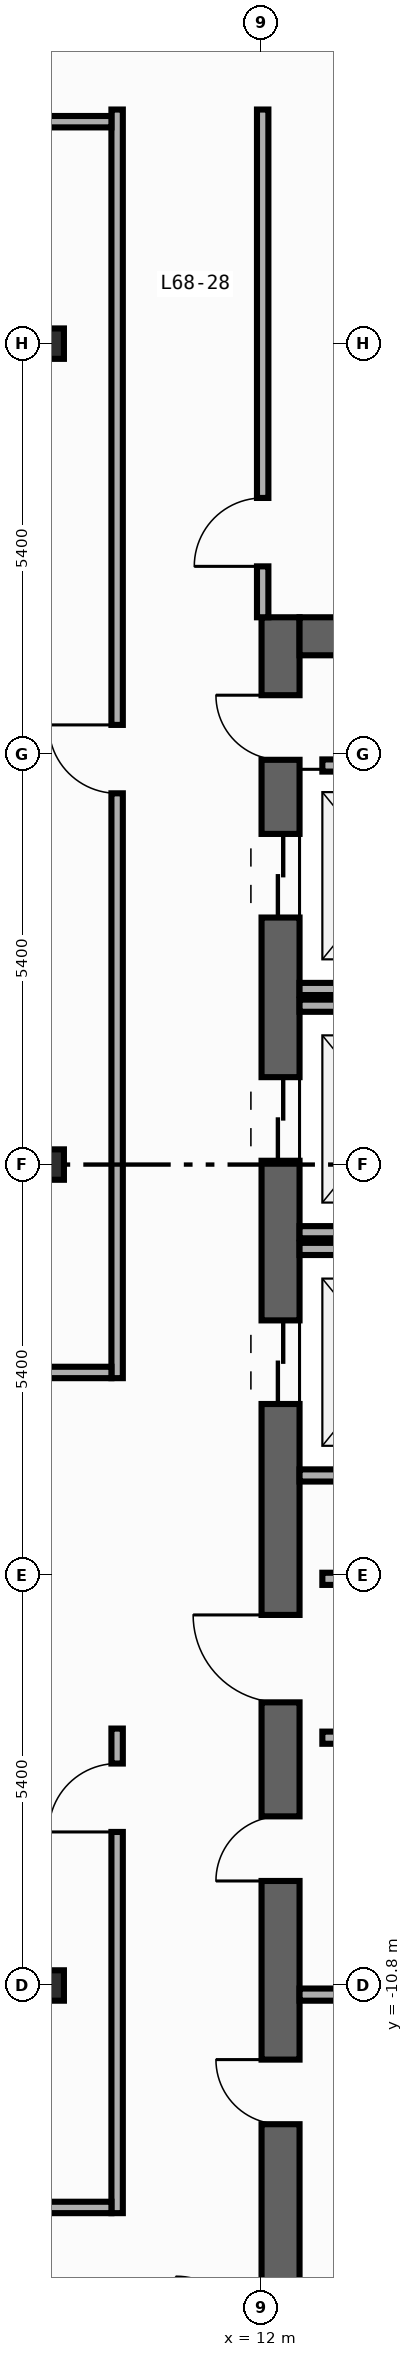
"""IFC4 building model, lengths in metres.
Left out: names, types, materials, properties, quantities, classifications, styles, units other than length and angle.
Written with IfcOpenShell. Run it as: python <this file> out.ifc"""

import sys

from ifc_helpers import new_model, si_unit, direction, frame, frame_2d, origin, origin_2d, place, context, subcontext, project, spatial, rectangle, i_section, extrude, element, fill, save


model = new_model("IFC4")
c1 = context("Model", 3, precision=1e-05, world=origin(), true_north=direction((0.0, 1.0)))
c2 = subcontext(c1, "Body", "Model", "MODEL_VIEW")
j1 = project(units=[si_unit("LENGTHUNIT", "METRE"), si_unit("PLANEANGLEUNIT", "RADIAN")], contexts=[c1])
p1 = place(None, origin())
s1 = spatial("IfcSite", under=j1, at=p1, CompositionType="ELEMENT")
p2 = place(p1, origin())
s2 = spatial("IfcBuilding", under=s1, at=p2, CompositionType="ELEMENT")
p3 = place(p2, frame((0.0, 0.0, 285.2)))
s3 = spatial("IfcBuildingStorey", under=s2, at=p3, CompositionType="ELEMENT", Elevation=285.2)
p4 = place(p3, frame((12.25, -19.8, 0.0), z_axis=(0.0, 0.0, 1.0), x_axis=(0.0, 1.0, 0.0)))
e1 = element("IfcWall", 1, at=p4, inside=s3, PredefinedType="SHEAR", context=c2, shape_type="SweptSolid", body=[
    extrude(rectangle(XDim=27.0, YDim=0.5, at=frame_2d((13.5, 0.0))), origin(), (0.0, 0.0, 1.0), 3.54),
])
p5 = place(p4, frame((23.05, 0.0, 0.0)))
e2 = element("IfcOpeningElement", 2, at=p5, cuts=e1, PredefinedType="OPENING", context=c2, shape_type="SweptSolid", body=[
    extrude(rectangle(XDim=1.1, YDim=2.2, at=frame_2d((0.55, 1.1))), frame((0.0, 0.26, 0.0), z_axis=(0.0, -1.0, 0.0), x_axis=(1.0, 0.0, 0.0)), (0.0, 0.0, 1.0), 0.52),
])
p6 = place(p4, frame((19.85, 0.0, 0.0)))
e3 = element("IfcOpeningElement", 3, at=p6, cuts=e1, PredefinedType="OPENING", context=c2, shape_type="SweptSolid", body=[
    extrude(rectangle(XDim=1.1, YDim=2.2, at=frame_2d((0.55, 1.1))), frame((0.0, 0.26, 0.0), z_axis=(0.0, -1.0, 0.0), x_axis=(1.0, 0.0, 0.0)), (0.0, 0.0, 1.0), 0.52),
])
p7 = place(p4, frame((16.65, 0.0, 0.0)))
e4 = element("IfcOpeningElement", 4, at=p7, cuts=e1, PredefinedType="OPENING", context=c2, shape_type="SweptSolid", body=[
    extrude(rectangle(XDim=1.1, YDim=2.2, at=frame_2d((0.55, 1.1))), frame((0.0, 0.26, 0.0), z_axis=(0.0, -1.0, 0.0), x_axis=(1.0, 0.0, 0.0)), (0.0, 0.0, 1.0), 0.52),
])
p8 = place(p4, frame((7.175, 0.0, 0.0)))
e5 = element("IfcOpeningElement", 5, at=p8, cuts=e1, PredefinedType="OPENING", context=c2, shape_type="SweptSolid", body=[
    extrude(rectangle(XDim=0.85, YDim=2.1, at=frame_2d((0.425, 1.05))), frame((0.0, 0.26, 0.0), z_axis=(0.0, -1.0, 0.0), x_axis=(1.0, 0.0, 0.0)), (0.0, 0.0, 1.0), 0.52),
])
p9 = place(p4, frame((10.375, 0.0, 0.0)))
e6 = element("IfcOpeningElement", 6, at=p9, cuts=e1, PredefinedType="OPENING", context=c2, shape_type="SweptSolid", body=[
    extrude(rectangle(XDim=0.85, YDim=2.1, at=frame_2d((0.425, 1.05))), frame((0.0, 0.26, 0.0), z_axis=(0.0, -1.0, 0.0), x_axis=(1.0, 0.0, 0.0)), (0.0, 0.0, 1.0), 0.52),
])
p10 = place(p4, frame((12.725, 0.0, 0.0)))
e7 = element("IfcOpeningElement", 7, at=p10, cuts=e1, PredefinedType="OPENING", context=c2, shape_type="SweptSolid", body=[
    extrude(rectangle(XDim=1.15, YDim=2.2, at=frame_2d((0.575, 1.1))), frame((0.0, 0.26, 0.0), z_axis=(0.0, -1.0, 0.0), x_axis=(1.0, 0.0, 0.0)), (0.0, 0.0, 1.0), 0.52),
])
p11 = place(p4, frame((25.125, 0.0, 0.0)))
e8 = element("IfcOpeningElement", 8, at=p11, cuts=e1, PredefinedType="OPENING", context=c2, shape_type="SweptSolid", body=[
    extrude(rectangle(XDim=0.85, YDim=2.1, at=frame_2d((0.425, 1.05))), frame((0.0, 0.26, 0.0), z_axis=(0.0, -1.0, 0.0), x_axis=(1.0, 0.0, 0.0)), (0.0, 0.0, 1.0), 0.52),
])
p12 = place(p3, frame((12.5, 6.95, 0.0), z_axis=(0.0, 0.0, 1.0), x_axis=(1.0, 0.0, 0.0)))
e9 = element("IfcWall", 9, at=p12, inside=s3, PredefinedType="SHEAR", context=c2, shape_type="SweptSolid", body=[
    extrude(rectangle(XDim=7.4, YDim=0.5, at=frame_2d((3.7, 0.0))), origin(), (0.0, 0.0, 1.0), 3.54),
])
for number, where, z_axis, x_axis in (
    (10, (9.2, -10.8, 0.0), (0.0, 0.0, 1.0), (1.0, 0.0, 0.0)),
    (11, (9.2, 0.0, 0.0), (0.0, 0.0, 1.0), (1.0, 0.0, 0.0)),
    (12, (9.2, 10.8, 0.0), (0.0, 0.0, 1.0), (1.0, 0.0, 0.0)),
):
    element("IfcColumn", number, at=place(p3, frame(where, z_axis=z_axis, x_axis=x_axis)), inside=s3, PredefinedType="COLUMN", context=c2, shape_type="SweptSolid", body=[
        extrude(i_section(OverallWidth=0.4, OverallDepth=0.4, WebThickness=0.013, FlangeThickness=0.021, FilletRadius=0.022, at=origin_2d()), origin(), (0.0, 0.0, 1.0), 3.8),
    ])
for number, where, z_axis, x_axis in (
    (13, (12.5, 2.31, 0.0), (0.0, 0.0, 1.0), (1.0, 0.0, 0.0)),
    (14, (12.5, -0.89, 0.0), (0.0, 0.0, 1.0), (1.0, 0.0, 0.0)),
    (15, (12.5, 2.09, 0.0), (0.0, 0.0, 1.0), (1.0, 0.0, 0.0)),
    (16, (12.5, -4.09, 0.0), (0.0, 0.0, 1.0), (1.0, 0.0, 0.0)),
    (17, (12.5, -1.11, 0.0), (0.0, 0.0, 1.0), (1.0, 0.0, 0.0)),
):
    element("IfcWall", number, at=place(p3, frame(where, z_axis=z_axis, x_axis=x_axis)), inside=s3, PredefinedType="STANDARD", context=c2, shape_type="SweptSolid", body=[
        extrude(rectangle(XDim=2.49, YDim=0.16, at=frame_2d((1.245, 0.0))), origin(), (0.0, 0.0, 1.0), 3.54),
    ])
for number, where, z_axis, x_axis in (
    (18, (12.8, -5.45, 0.0), (0.0, 0.0, 1.0), (1.0, 0.0, 0.0)),
    (19, (12.8, -7.54, 0.0), (0.0, 0.0, 1.0), (1.0, 0.0, 0.0)),
    (20, (12.8, 5.25, 0.0), (0.0, 0.0, 1.0), (1.0, 0.0, 0.0)),
):
    element("IfcWall", number, at=place(p3, frame(where, z_axis=z_axis, x_axis=x_axis)), inside=s3, PredefinedType="STANDARD", context=c2, shape_type="SweptSolid", body=[
        extrude(rectangle(XDim=2.6, YDim=0.16, at=frame_2d((1.3, 0.0))), origin(), (0.0, 0.0, 1.0), 3.54),
    ])
p13 = place(p3, frame((12.5, -10.92, 0.0), z_axis=(0.0, 0.0, 1.0), x_axis=(1.0, 0.0, 0.0)))
e21 = element("IfcWall", 21, at=p13, inside=s3, PredefinedType="PARTITIONING", context=c2, shape_type="SweptSolid", body=[
    extrude(rectangle(XDim=2.9, YDim=0.16, at=frame_2d((1.45, 0.0))), origin(), (0.0, 0.0, 1.0), 2.64),
])
p14 = place(p3, frame((12.015, 7.2, 0.0), z_axis=(0.0, 0.0, 1.0), x_axis=(0.0, 1.0, 0.0)))
e22 = element("IfcWall", 22, at=p14, inside=s3, PredefinedType="PARTITIONING", context=c2, shape_type="SweptSolid", body=[
    extrude(rectangle(XDim=6.68, YDim=0.15, at=frame_2d((3.34, 0.0))), origin(), (0.0, 0.0, 1.0), 3.54),
])
p15 = place(p14, frame((0.67, 0.0, 0.0)))
e23 = element("IfcOpeningElement", 23, at=p15, cuts=e22, PredefinedType="OPENING", context=c2, shape_type="SweptSolid", body=[
    extrude(rectangle(XDim=0.9, YDim=2.15, at=frame_2d((0.45, 1.075))), frame((0.0, 0.085, 0.0), z_axis=(0.0, -1.0, 0.0), x_axis=(1.0, 0.0, 0.0)), (0.0, 0.0, 1.0), 0.17),
])
p16 = place(p3, frame((10.1, -2.81, 0.0), z_axis=(0.0, 0.0, 1.0), x_axis=(0.0, 1.0, 0.0)))
e24 = element("IfcWall", 24, at=p16, inside=s3, PredefinedType="PARTITIONING", context=c2, shape_type="SweptSolid", body=[
    extrude(rectangle(XDim=16.69, YDim=0.15, at=frame_2d((8.345, 0.0))), origin(), (0.0, 0.0, 1.0), 3.54),
])
p17 = place(p16, frame((7.694, 0.0, 0.0)))
e25 = element("IfcOpeningElement", 25, at=p17, cuts=e24, PredefinedType="OPENING", context=c2, shape_type="SweptSolid", body=[
    extrude(rectangle(XDim=0.9, YDim=2.15, at=frame_2d((0.45, 1.075))), frame((0.0, 0.085, 0.0), z_axis=(0.0, -1.0, 0.0), x_axis=(1.0, 0.0, 0.0)), (0.0, 0.0, 1.0), 0.17),
])
p18 = place(p3, frame((10.1, -13.795, 0.0), z_axis=(0.0, 0.0, 1.0), x_axis=(0.0, 1.0, 0.0)))
e26 = element("IfcWall", 26, at=p18, inside=s3, PredefinedType="PARTITIONING", context=c2, shape_type="SweptSolid", body=[
    extrude(rectangle(XDim=6.375, YDim=0.15, at=frame_2d((3.188, 0.0))), origin(), (0.0, 0.0, 1.0), 3.54),
])
p19 = place(p18, frame((5.015, 0.0, 0.0)))
e27 = element("IfcOpeningElement", 27, at=p19, cuts=e26, PredefinedType="OPENING", context=c2, shape_type="SweptSolid", body=[
    extrude(rectangle(XDim=0.9, YDim=2.15, at=frame_2d((0.45, 1.075))), frame((0.0, 0.085, 0.0), z_axis=(0.0, -1.0, 0.0), x_axis=(1.0, 0.0, 0.0)), (0.0, 0.0, 1.0), 0.17),
])
p20 = place(p3, frame((-3.01, -2.735, 0.0), z_axis=(0.0, 0.0, 1.0), x_axis=(1.0, 0.0, 0.0)))
e28 = element("IfcWall", 28, at=p20, inside=s3, PredefinedType="PARTITIONING", context=c2, shape_type="SweptSolid", body=[
    extrude(rectangle(XDim=13.035, YDim=0.15, at=frame_2d((6.518, 0.0))), origin(), (0.0, 0.0, 1.0), 3.54),
])
p21 = place(p20, frame((2.463, 0.0, 0.0)))
e29 = element("IfcOpeningElement", 29, at=p21, cuts=e28, PredefinedType="OPENING", context=c2, shape_type="SweptSolid", body=[
    extrude(rectangle(XDim=0.9, YDim=2.15, at=frame_2d((0.45, 1.075))), frame((0.0, 0.085, 0.0), z_axis=(0.0, -1.0, 0.0), x_axis=(1.0, 0.0, 0.0)), (0.0, 0.0, 1.0), 0.17),
])
p22 = place(p3, frame((-2.86, 13.72, 0.0), z_axis=(0.0, 0.0, 1.0), x_axis=(1.0, 0.0, 0.0)))
e30 = element("IfcWall", 30, at=p22, inside=s3, PredefinedType="PARTITIONING", context=c2, shape_type="SweptSolid", body=[
    extrude(rectangle(XDim=12.885, YDim=0.15, at=frame_2d((6.442, 0.0))), origin(), (0.0, 0.0, 1.0), 3.54),
])
p23 = place(p22, frame((4.692, 0.0, 0.0)))
e31 = element("IfcOpeningElement", 31, at=p23, cuts=e30, PredefinedType="OPENING", context=c2, shape_type="SweptSolid", body=[
    extrude(rectangle(XDim=0.9, YDim=2.15, at=frame_2d((0.45, 1.075))), frame((0.0, 0.085, 0.0), z_axis=(0.0, -1.0, 0.0), x_axis=(1.0, 0.0, 0.0)), (0.0, 0.0, 1.0), 0.17),
])
p24 = place(p3, frame((-3.03, -13.72, 0.0), z_axis=(0.0, 0.0, 1.0), x_axis=(1.0, 0.0, 0.0)))
e32 = element("IfcWall", 32, at=p24, inside=s3, PredefinedType="PARTITIONING", context=c2, shape_type="SweptSolid", body=[
    extrude(rectangle(XDim=13.055, YDim=0.15, at=frame_2d((6.527, 0.0))), origin(), (0.0, 0.0, 1.0), 3.54),
])
p25 = place(p24, frame((4.874, 0.0, 0.0)))
e33 = element("IfcOpeningElement", 33, at=p25, cuts=e32, PredefinedType="OPENING", context=c2, shape_type="SweptSolid", body=[
    extrude(rectangle(XDim=0.9, YDim=2.15, at=frame_2d((0.45, 1.075))), frame((0.0, 0.085, 0.0), z_axis=(0.0, -1.0, 0.0), x_axis=(1.0, 0.0, 0.0)), (0.0, 0.0, 1.0), 0.17),
])
p26 = place(p5, origin())
e34 = element("IfcDoor", 34, at=p26, inside=s3, OperationType="DOUBLE_DOOR_SLIDING", PredefinedType="DOOR", context=c2, shape_type="SweptSolid", body=[
    extrude(rectangle(XDim=1.1, YDim=2.2, at=frame_2d((0.55, 1.1))), frame((0.0, 0.025, 0.0), z_axis=(0.0, -1.0, 0.0), x_axis=(1.0, 0.0, 0.0)), (0.0, 0.0, 1.0), 0.05),
])
fill(e2, e34)
p27 = place(p6, origin())
e35 = element("IfcDoor", 35, at=p27, inside=s3, OperationType="DOUBLE_DOOR_SLIDING", PredefinedType="DOOR", context=c2, shape_type="SweptSolid", body=[
    extrude(rectangle(XDim=1.1, YDim=2.2, at=frame_2d((0.55, 1.1))), frame((0.0, 0.025, 0.0), z_axis=(0.0, -1.0, 0.0), x_axis=(1.0, 0.0, 0.0)), (0.0, 0.0, 1.0), 0.05),
])
fill(e3, e35)
p28 = place(p7, origin())
e36 = element("IfcDoor", 36, at=p28, inside=s3, OperationType="DOUBLE_DOOR_SLIDING", PredefinedType="DOOR", context=c2, shape_type="SweptSolid", body=[
    extrude(rectangle(XDim=1.1, YDim=2.2, at=frame_2d((0.55, 1.1))), frame((0.0, 0.025, 0.0), z_axis=(0.0, -1.0, 0.0), x_axis=(1.0, 0.0, 0.0)), (0.0, 0.0, 1.0), 0.05),
])
fill(e4, e36)
p29 = place(p8, origin())
e37 = element("IfcDoor", 37, at=p29, inside=s3, OperationType="SINGLE_SWING_RIGHT", PredefinedType="DOOR", context=c2, shape_type="SweptSolid", body=[
    extrude(rectangle(XDim=0.85, YDim=2.1, at=frame_2d((0.425, 1.05))), frame((0.0, 0.025, 0.0), z_axis=(0.0, -1.0, 0.0), x_axis=(1.0, 0.0, 0.0)), (0.0, 0.0, 1.0), 0.05),
])
fill(e5, e37)
p30 = place(p9, origin())
e38 = element("IfcDoor", 38, at=p30, inside=s3, OperationType="SINGLE_SWING_LEFT", PredefinedType="DOOR", context=c2, shape_type="SweptSolid", body=[
    extrude(rectangle(XDim=0.85, YDim=2.1, at=frame_2d((0.425, 1.05))), frame((0.0, 0.025, 0.0), z_axis=(0.0, -1.0, 0.0), x_axis=(1.0, 0.0, 0.0)), (0.0, 0.0, 1.0), 0.05),
])
fill(e6, e38)
p31 = place(p10, origin())
e39 = element("IfcDoor", 39, at=p31, inside=s3, OperationType="SINGLE_SWING_RIGHT", PredefinedType="DOOR", context=c2, shape_type="SweptSolid", body=[
    extrude(rectangle(XDim=1.15, YDim=2.2, at=frame_2d((0.575, 1.1))), frame((0.0, 0.025, 0.0), z_axis=(0.0, -1.0, 0.0), x_axis=(1.0, 0.0, 0.0)), (0.0, 0.0, 1.0), 0.05),
])
fill(e7, e39)
p32 = place(p11, origin())
e40 = element("IfcDoor", 40, at=p32, inside=s3, OperationType="SINGLE_SWING_RIGHT", PredefinedType="DOOR", context=c2, shape_type="SweptSolid", body=[
    extrude(rectangle(XDim=0.85, YDim=2.1, at=frame_2d((0.425, 1.05))), frame((0.0, 0.025, 0.0), z_axis=(0.0, -1.0, 0.0), x_axis=(1.0, 0.0, 0.0)), (0.0, 0.0, 1.0), 0.05),
])
fill(e8, e40)
p33 = place(p15, origin())
e41 = element("IfcDoor", 41, at=p33, inside=s3, OperationType="SINGLE_SWING_LEFT", PredefinedType="DOOR", context=c2, shape_type="SweptSolid", body=[
    extrude(rectangle(XDim=0.9, YDim=2.15, at=frame_2d((0.45, 1.075))), frame((0.0, 0.025, 0.0), z_axis=(0.0, -1.0, 0.0), x_axis=(1.0, 0.0, 0.0)), (0.0, 0.0, 1.0), 0.05),
])
fill(e23, e41)
p34 = place(p17, origin())
e42 = element("IfcDoor", 42, at=p34, inside=s3, OperationType="SINGLE_SWING_RIGHT", PredefinedType="DOOR", context=c2, shape_type="SweptSolid", body=[
    extrude(rectangle(XDim=0.9, YDim=2.15, at=frame_2d((0.45, 1.075))), frame((0.0, 0.025, 0.0), z_axis=(0.0, -1.0, 0.0), x_axis=(1.0, 0.0, 0.0)), (0.0, 0.0, 1.0), 0.05),
])
fill(e25, e42)
p35 = place(p19, origin())
e43 = element("IfcDoor", 43, at=p35, inside=s3, OperationType="SINGLE_SWING_LEFT", PredefinedType="DOOR", context=c2, shape_type="SweptSolid", body=[
    extrude(rectangle(XDim=0.9, YDim=2.15, at=frame_2d((0.45, 1.075))), frame((0.0, 0.025, 0.0), z_axis=(0.0, -1.0, 0.0), x_axis=(1.0, 0.0, 0.0)), (0.0, 0.0, 1.0), 0.05),
])
fill(e27, e43)
save(model, sys.argv[1])
